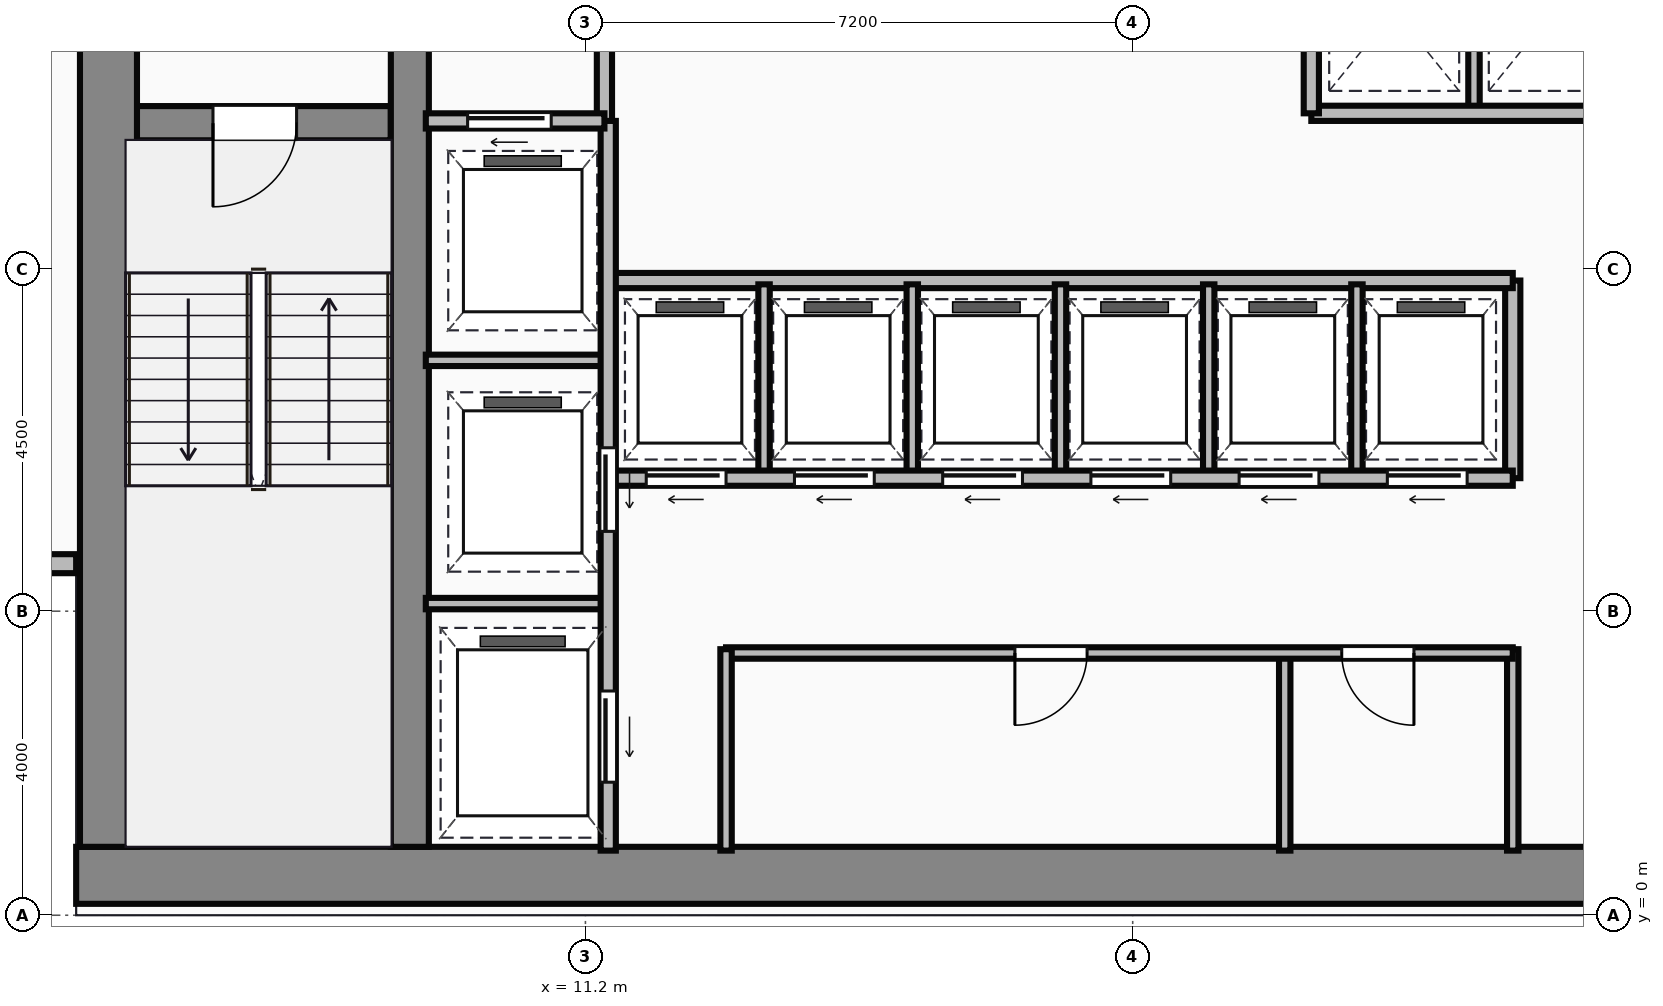
"""IFC4 building model, lengths in metres.
Left out: names, types, materials, properties, quantities, classifications, styles, units other than length and angle.
Written with IfcOpenShell. Run it as: python <this file> out.ifc"""

import sys

from ifc_helpers import new_model, si_unit, direction, frame, frame_2d, origin, place, context, subcontext, project, spatial, rectangle, extrude, source, transform, mapped, element, fill, save


model = new_model("IFC4")
c1 = context("Model", 3, precision=1e-05, world=origin(), true_north=direction((0.0, 1.0)))
c2 = subcontext(c1, "Body", "Model", "MODEL_VIEW")
j1 = project(units=[si_unit("LENGTHUNIT", "METRE"), si_unit("PLANEANGLEUNIT", "RADIAN")], contexts=[c1])
p1 = place(None, origin())
s1 = spatial("IfcSite", under=j1, at=p1, CompositionType="ELEMENT")
p2 = place(p1, origin())
s2 = spatial("IfcBuilding", under=s1, at=p2, CompositionType="ELEMENT")
p3 = place(p2, frame((0.0, 0.0, 106.9)))
s3 = spatial("IfcBuildingStorey", under=s2, at=p3, CompositionType="ELEMENT", Elevation=106.9)
m1 = source(origin(), c2, "Body", "SweptSolid", [
    extrude(rectangle(XDim=29.5, YDim=0.75, at=frame_2d((14.75, 0.0))), origin(), (0.0, 0.0, 1.0), 3.65),
])
p4 = place(p3, frame((4.5, 0.525, 0.0), z_axis=(0.0, 0.0, 1.0), x_axis=(1.0, 0.0, 0.0)))
e1 = element("IfcWall", 1, at=p4, inside=s3, PredefinedType="SHEAR", context=c2, shape_type="MappedRepresentation", body=[
    mapped(m1, transform((0.0, 0.0, 0.0))),
])
m2 = source(origin(), c2, "Body", "SweptSolid", [
    extrude(rectangle(XDim=13.1, YDim=0.75, at=frame_2d((6.55, 0.0))), origin(), (0.0, 0.0, 1.0), 3.65),
])
p5 = place(p3, frame((4.925, 0.9, 0.0), z_axis=(0.0, 0.0, 1.0), x_axis=(0.0, 1.0, 0.0)))
e2 = element("IfcWall", 2, at=p5, inside=s3, PredefinedType="SHEAR", context=c2, shape_type="MappedRepresentation", body=[
    mapped(m2, transform((0.0, 0.0, 0.0))),
])
m3 = source(origin(), c2, "Body", "SweptSolid", [
    extrude(rectangle(XDim=12.35, YDim=0.5, at=frame_2d((6.175, 0.0))), origin(), (0.0, 0.0, 1.0), 3.65),
])
p6 = place(p3, frame((8.89, 0.9, 0.0), z_axis=(0.0, 0.0, 1.0), x_axis=(0.0, 1.0, 0.0)))
e3 = element("IfcWall", 3, at=p6, inside=s3, PredefinedType="SHEAR", context=c2, shape_type="MappedRepresentation", body=[
    mapped(m3, transform((0.0, 0.0, 0.0))),
])
m4 = source(origin(), c2, "Body", "SweptSolid", [
    extrude(rectangle(XDim=3.39, YDim=0.45, at=frame_2d((1.695, 0.0))), origin(), (0.0, 0.0, 1.0), 3.65),
])
p7 = place(p3, frame((5.25, 10.42, 0.0), z_axis=(0.0, 0.0, 1.0), x_axis=(1.0, 0.0, 0.0)))
e4 = element("IfcWall", 4, at=p7, inside=s3, PredefinedType="SHEAR", context=c2, shape_type="MappedRepresentation", body=[
    mapped(m4, transform((0.0, 0.0, 0.0))),
])
p8 = place(p7, frame((1.05, 0.0, 0.0)))
e5 = element("IfcOpeningElement", 5, at=p8, cuts=e4, PredefinedType="OPENING", context=c2, shape_type="SweptSolid", body=[
    extrude(rectangle(XDim=1.1, YDim=2.15, at=frame_2d((0.55, 1.075))), frame((0.0, 0.235, 0.0), z_axis=(0.0, -1.0, 0.0), x_axis=(1.0, 0.0, 0.0)), (0.0, 0.0, 1.0), 0.47),
])
m5 = source(origin(), c2, "Body", "SweptSolid", [
    extrude(rectangle(XDim=4.5, YDim=0.25, at=frame_2d((2.25, 0.0))), origin(), (0.0, 0.0, 1.0), 3.4),
])
p9 = place(p3, frame((0.0, 4.625, 0.0), z_axis=(0.0, 0.0, 1.0), x_axis=(1.0, 0.0, 0.0)))
e6 = element("IfcWall", 6, at=p9, inside=s3, PredefinedType="STANDARD", context=c2, shape_type="MappedRepresentation", body=[
    mapped(m5, transform((0.0, 0.0, 0.0))),
])
m6 = source(origin(), c2, "Body", "SweptSolid", [
    extrude(rectangle(XDim=3.18, YDim=0.2, at=frame_2d((1.59, 0.0))), origin(), (0.0, 0.0, 1.0), 3.4),
])
p10 = place(p3, frame((11.45, 10.42, 0.0), z_axis=(0.0, 0.0, 1.0), x_axis=(0.0, 1.0, 0.0)))
e7 = element("IfcWall", 7, at=p10, inside=s3, PredefinedType="PARTITIONING", context=c2, shape_type="MappedRepresentation", body=[
    mapped(m6, transform((0.0, 0.0, 0.0))),
])
m7 = source(origin(), c2, "Body", "SweptSolid", [
    extrude(rectangle(XDim=2.35, YDim=0.2, at=frame_2d((1.175, 0.0))), origin(), (0.0, 0.0, 1.0), 3.4),
])
p11 = place(p3, frame((9.1, 10.45, 0.0), z_axis=(0.0, 0.0, 1.0), x_axis=(1.0, 0.0, 0.0)))
e8 = element("IfcWall", 8, at=p11, inside=s3, PredefinedType="PARTITIONING", context=c2, shape_type="MappedRepresentation", body=[
    mapped(m7, transform((0.0, 0.0, 0.0))),
])
p12 = place(p11, frame((0.55, 0.0, 0.0)))
e9 = element("IfcOpeningElement", 9, at=p12, cuts=e8, PredefinedType="OPENING", context=c2, shape_type="SweptSolid", body=[
    extrude(rectangle(XDim=1.1, YDim=2.15, at=frame_2d((0.55, 1.075))), frame((0.0, 0.11, 0.0), z_axis=(0.0, -1.0, 0.0), x_axis=(1.0, 0.0, 0.0)), (0.0, 0.0, 1.0), 0.22),
])
m8 = source(origin(), c2, "Body", "SweptSolid", [
    extrude(rectangle(XDim=9.6, YDim=0.2, at=frame_2d((4.8, 0.0))), origin(), (0.0, 0.0, 1.0), 3.4),
])
p13 = place(p3, frame((11.5, 0.85, 0.0), z_axis=(0.0, 0.0, 1.0), x_axis=(0.0, 1.0, 0.0)))
e10 = element("IfcWall", 10, at=p13, inside=s3, PredefinedType="PARTITIONING", context=c2, shape_type="MappedRepresentation", body=[
    mapped(m8, transform((0.0, 0.0, 0.0))),
])
p14 = place(p13, frame((4.2, 0.0, 0.0)))
e11 = element("IfcOpeningElement", 11, at=p14, cuts=e10, PredefinedType="OPENING", context=c2, shape_type="SweptSolid", body=[
    extrude(rectangle(XDim=1.1, YDim=2.15, at=frame_2d((0.55, 1.075))), frame((0.0, 0.11, 0.0), z_axis=(0.0, -1.0, 0.0), x_axis=(1.0, 0.0, 0.0)), (0.0, 0.0, 1.0), 0.22),
])
p15 = place(p13, frame((0.9, 0.0, 0.0)))
e12 = element("IfcOpeningElement", 12, at=p15, cuts=e10, PredefinedType="OPENING", context=c2, shape_type="SweptSolid", body=[
    extrude(rectangle(XDim=1.2, YDim=2.15, at=frame_2d((0.6, 1.075))), frame((0.0, 0.11, 0.0), z_axis=(0.0, -1.0, 0.0), x_axis=(1.0, 0.0, 0.0)), (0.0, 0.0, 1.0), 0.22),
])
m9 = source(origin(), c2, "Body", "SweptSolid", [
    extrude(rectangle(XDim=2.4, YDim=0.15, at=frame_2d((1.2, 0.0))), origin(), (0.0, 0.0, 1.0), 3.4),
])
for number, where, z_axis, x_axis in (
    (13, (9.1, 4.1, 0.0), (0.0, 0.0, 1.0), (1.0, 0.0, 0.0)),
    (14, (9.1, 7.3, 0.0), (0.0, 0.0, 1.0), (1.0, 0.0, 0.0)),
):
    element("IfcWall", number, at=place(p3, frame(where, z_axis=z_axis, x_axis=x_axis)), inside=s3, PredefinedType="PARTITIONING", context=c2, shape_type="MappedRepresentation", body=[
        mapped(m9, transform((0.0, 0.0, 0.0))),
    ])
m10 = source(origin(), c2, "Body", "SweptSolid", [
    extrude(rectangle(XDim=2.65, YDim=0.15, at=frame_2d((1.325, 0.0))), origin(), (0.0, 0.0, 1.0), 3.4),
])
p16 = place(p3, frame((13.05, 0.85, 0.0), z_axis=(0.0, 0.0, 1.0), x_axis=(0.0, 1.0, 0.0)))
e15 = element("IfcWall", 15, at=p16, inside=s3, PredefinedType="PARTITIONING", context=c2, shape_type="MappedRepresentation", body=[
    mapped(m10, transform((0.0, 0.0, 0.0))),
])
m11 = source(origin(), c2, "Body", "SweptSolid", [
    extrude(rectangle(XDim=10.35, YDim=0.15, at=frame_2d((5.175, 0.0))), origin(), (0.0, 0.0, 1.0), 3.4),
])
p17 = place(p3, frame((13.05, 3.45, 0.0), z_axis=(0.0, 0.0, 1.0), x_axis=(1.0, 0.0, 0.0)))
e16 = element("IfcWall", 16, at=p17, inside=s3, PredefinedType="PARTITIONING", context=c2, shape_type="MappedRepresentation", body=[
    mapped(m11, transform((0.0, 0.0, 0.0))),
])
p18 = place(p17, frame((3.8, 0.0, 0.0)))
e17 = element("IfcOpeningElement", 17, at=p18, cuts=e16, PredefinedType="OPENING", context=c2, shape_type="SweptSolid", body=[
    extrude(rectangle(XDim=0.95, YDim=2.15, at=frame_2d((0.475, 1.075))), frame((0.0, 0.085, 0.0), z_axis=(0.0, -1.0, 0.0), x_axis=(1.0, 0.0, 0.0)), (0.0, 0.0, 1.0), 0.17),
])
p19 = place(p17, frame((8.1, 0.0, 0.0)))
e18 = element("IfcOpeningElement", 18, at=p19, cuts=e16, PredefinedType="OPENING", context=c2, shape_type="SweptSolid", body=[
    extrude(rectangle(XDim=0.95, YDim=2.15, at=frame_2d((0.475, 1.075))), frame((0.0, 0.085, 0.0), z_axis=(0.0, -1.0, 0.0), x_axis=(1.0, 0.0, 0.0)), (0.0, 0.0, 1.0), 0.17),
])
p20 = place(p3, frame((23.4, 0.85, 0.0), z_axis=(0.0, 0.0, 1.0), x_axis=(0.0, 1.0, 0.0)))
e19 = element("IfcWall", 19, at=p20, inside=s3, PredefinedType="PARTITIONING", context=c2, shape_type="MappedRepresentation", body=[
    mapped(m10, transform((0.0, 0.0, 0.0))),
])
m12 = source(origin(), c2, "Body", "SweptSolid", [
    extrude(rectangle(XDim=2.6, YDim=0.15, at=frame_2d((1.3, 0.0))), origin(), (0.0, 0.0, 1.0), 3.4),
])
p21 = place(p3, frame((20.4, 0.85, 0.0), z_axis=(0.0, 0.0, 1.0), x_axis=(0.0, 1.0, 0.0)))
e20 = element("IfcWall", 20, at=p21, inside=s3, PredefinedType="PARTITIONING", context=c2, shape_type="MappedRepresentation", body=[
    mapped(m12, transform((0.0, 0.0, 0.0))),
])
m13 = source(origin(), c2, "Body", "SweptSolid", [
    extrude(rectangle(XDim=11.85, YDim=0.2, at=frame_2d((5.925, 0.0))), origin(), (0.0, 0.0, 1.0), 3.4),
])
p22 = place(p3, frame((11.55, 5.75, 0.0), z_axis=(0.0, 0.0, 1.0), x_axis=(1.0, 0.0, 0.0)))
e21 = element("IfcWall", 21, at=p22, inside=s3, PredefinedType="PARTITIONING", context=c2, shape_type="MappedRepresentation", body=[
    mapped(m13, transform((0.0, 0.0, 0.0))),
])
p23 = place(p22, frame((0.45, 0.0, 0.0)))
e22 = element("IfcOpeningElement", 22, at=p23, cuts=e21, PredefinedType="OPENING", context=c2, shape_type="SweptSolid", body=[
    extrude(rectangle(XDim=1.05, YDim=2.15, at=frame_2d((0.525, 1.075))), frame((0.0, 0.11, 0.0), z_axis=(0.0, -1.0, 0.0), x_axis=(1.0, 0.0, 0.0)), (0.0, 0.0, 1.0), 0.22),
])
p24 = place(p22, frame((2.4, 0.0, 0.0)))
e23 = element("IfcOpeningElement", 23, at=p24, cuts=e21, PredefinedType="OPENING", context=c2, shape_type="SweptSolid", body=[
    extrude(rectangle(XDim=1.05, YDim=2.15, at=frame_2d((0.525, 1.075))), frame((0.0, 0.11, 0.0), z_axis=(0.0, -1.0, 0.0), x_axis=(1.0, 0.0, 0.0)), (0.0, 0.0, 1.0), 0.22),
])
p25 = place(p22, frame((4.35, 0.0, 0.0)))
e24 = element("IfcOpeningElement", 24, at=p25, cuts=e21, PredefinedType="OPENING", context=c2, shape_type="SweptSolid", body=[
    extrude(rectangle(XDim=1.05, YDim=2.15, at=frame_2d((0.525, 1.075))), frame((0.0, 0.11, 0.0), z_axis=(0.0, -1.0, 0.0), x_axis=(1.0, 0.0, 0.0)), (0.0, 0.0, 1.0), 0.22),
])
p26 = place(p22, frame((6.3, 0.0, 0.0)))
e25 = element("IfcOpeningElement", 25, at=p26, cuts=e21, PredefinedType="OPENING", context=c2, shape_type="SweptSolid", body=[
    extrude(rectangle(XDim=1.05, YDim=2.15, at=frame_2d((0.525, 1.075))), frame((0.0, 0.11, 0.0), z_axis=(0.0, -1.0, 0.0), x_axis=(1.0, 0.0, 0.0)), (0.0, 0.0, 1.0), 0.22),
])
p27 = place(p22, frame((8.25, 0.0, 0.0)))
e26 = element("IfcOpeningElement", 26, at=p27, cuts=e21, PredefinedType="OPENING", context=c2, shape_type="SweptSolid", body=[
    extrude(rectangle(XDim=1.05, YDim=2.15, at=frame_2d((0.525, 1.075))), frame((0.0, 0.11, 0.0), z_axis=(0.0, -1.0, 0.0), x_axis=(1.0, 0.0, 0.0)), (0.0, 0.0, 1.0), 0.22),
])
p28 = place(p22, frame((10.2, 0.0, 0.0)))
e27 = element("IfcOpeningElement", 27, at=p28, cuts=e21, PredefinedType="OPENING", context=c2, shape_type="SweptSolid", body=[
    extrude(rectangle(XDim=1.05, YDim=2.15, at=frame_2d((0.525, 1.075))), frame((0.0, 0.11, 0.0), z_axis=(0.0, -1.0, 0.0), x_axis=(1.0, 0.0, 0.0)), (0.0, 0.0, 1.0), 0.22),
])
p29 = place(p3, frame((11.55, 8.35, 0.0), z_axis=(0.0, 0.0, 1.0), x_axis=(1.0, 0.0, 0.0)))
e28 = element("IfcWall", 28, at=p29, inside=s3, PredefinedType="PARTITIONING", context=c2, shape_type="MappedRepresentation", body=[
    mapped(m13, transform((0.0, 0.0, 0.0))),
])
m14 = source(origin(), c2, "Body", "SweptSolid", [
    extrude(rectangle(XDim=2.6, YDim=0.2, at=frame_2d((1.3, 0.0))), origin(), (0.0, 0.0, 1.0), 3.4),
])
p30 = place(p3, frame((23.4, 5.75, 0.0), z_axis=(0.0, 0.0, 1.0), x_axis=(0.0, 1.0, 0.0)))
e29 = element("IfcWall", 29, at=p30, inside=s3, PredefinedType="PARTITIONING", context=c2, shape_type="MappedRepresentation", body=[
    mapped(m14, transform((0.0, 0.0, 0.0))),
])
m15 = source(origin(), c2, "Body", "SweptSolid", [
    extrude(rectangle(XDim=2.5, YDim=0.15, at=frame_2d((1.25, 0.0))), origin(), (0.0, 0.0, 1.0), 3.4),
])
for number, where, z_axis, x_axis in (
    (30, (13.55, 5.8, 0.0), (0.0, 0.0, 1.0), (0.0, 1.0, 0.0)),
    (31, (15.5, 5.8, 0.0), (0.0, 0.0, 1.0), (0.0, 1.0, 0.0)),
    (32, (17.45, 5.8, 0.0), (0.0, 0.0, 1.0), (0.0, 1.0, 0.0)),
    (33, (19.4, 5.8, 0.0), (0.0, 0.0, 1.0), (0.0, 1.0, 0.0)),
    (34, (21.35, 5.8, 0.0), (0.0, 0.0, 1.0), (0.0, 1.0, 0.0)),
):
    element("IfcWall", number, at=place(p3, frame(where, z_axis=z_axis, x_axis=x_axis)), inside=s3, PredefinedType="PARTITIONING", context=c2, shape_type="MappedRepresentation", body=[
        mapped(m15, transform((0.0, 0.0, 0.0))),
    ])
m16 = source(origin(), c2, "Body", "SweptSolid", [
    extrude(rectangle(XDim=8.8, YDim=0.2, at=frame_2d((4.4, 0.0))), origin(), (0.0, 0.0, 1.0), 3.4),
])
p31 = place(p3, frame((20.75, 10.55, 0.0), z_axis=(0.0, 0.0, 1.0), x_axis=(1.0, 0.0, 0.0)))
e35 = element("IfcWall", 35, at=p31, inside=s3, PredefinedType="PARTITIONING", context=c2, shape_type="MappedRepresentation", body=[
    mapped(m16, transform((0.0, 0.0, 0.0))),
])
m17 = source(origin(), c2, "Body", "SweptSolid", [
    extrude(rectangle(XDim=3.0, YDim=0.2, at=frame_2d((1.5, 0.0))), origin(), (0.0, 0.0, 1.0), 3.4),
])
p32 = place(p3, frame((20.75, 10.55, 0.0), z_axis=(0.0, 0.0, 1.0), x_axis=(0.0, 1.0, 0.0)))
e36 = element("IfcWall", 36, at=p32, inside=s3, PredefinedType="PARTITIONING", context=c2, shape_type="MappedRepresentation", body=[
    mapped(m17, transform((0.0, 0.0, 0.0))),
])
m18 = source(origin(), c2, "Body", "SweptSolid", [
    extrude(rectangle(XDim=2.85, YDim=0.15, at=frame_2d((1.425, 0.0))), origin(), (0.0, 0.0, 1.0), 3.4),
])
p33 = place(p3, frame((22.89, 10.6, 0.0), z_axis=(0.0, 0.0, 1.0), x_axis=(0.0, 1.0, 0.0)))
e37 = element("IfcWall", 37, at=p33, inside=s3, PredefinedType="PARTITIONING", context=c2, shape_type="MappedRepresentation", body=[
    mapped(m18, transform((0.0, 0.0, 0.0))),
])
m19 = source(origin(), c2, "Body", "SweptSolid", [
    extrude(rectangle(XDim=1.1, YDim=2.15, at=frame_2d((0.55, 1.075))), frame((0.0, 0.025, 0.0), z_axis=(0.0, -1.0, 0.0), x_axis=(1.0, 0.0, 0.0)), (0.0, 0.0, 1.0), 0.05),
])
p34 = place(p8, frame((1.1, 0.0, 0.0), z_axis=(0.0, 0.0, 1.0), x_axis=(-1.0, 0.0, 0.0)))
e38 = element("IfcDoor", 38, at=p34, inside=s3, OperationType="SINGLE_SWING_LEFT", PredefinedType="DOOR", context=c2, shape_type="MappedRepresentation", body=[
    mapped(m19, transform((0.0, 0.0, 0.0))),
])
fill(e5, e38)
p35 = place(p12, origin())
e39 = element("IfcDoor", 39, at=p35, inside=s3, OperationType="SLIDING_TO_LEFT", PredefinedType="DOOR", context=c2, shape_type="MappedRepresentation", body=[
    mapped(m19, transform((0.0, 0.0, 0.0))),
])
fill(e9, e39)
p36 = place(p14, frame((1.1, 0.0, 0.0), z_axis=(0.0, 0.0, 1.0), x_axis=(-1.0, 0.0, 0.0)))
e40 = element("IfcDoor", 40, at=p36, inside=s3, OperationType="SLIDING_TO_LEFT", PredefinedType="DOOR", context=c2, shape_type="MappedRepresentation", body=[
    mapped(m19, transform((0.0, 0.0, 0.0))),
])
fill(e11, e40)
m20 = source(origin(), c2, "Body", "SweptSolid", [
    extrude(rectangle(XDim=1.2, YDim=2.15, at=frame_2d((0.6, 1.075))), frame((0.0, 0.025, 0.0), z_axis=(0.0, -1.0, 0.0), x_axis=(1.0, 0.0, 0.0)), (0.0, 0.0, 1.0), 0.05),
])
p37 = place(p15, frame((1.2, 0.0, 0.0), z_axis=(0.0, 0.0, 1.0), x_axis=(-1.0, 0.0, 0.0)))
e41 = element("IfcDoor", 41, at=p37, inside=s3, OperationType="SLIDING_TO_LEFT", PredefinedType="DOOR", context=c2, shape_type="MappedRepresentation", body=[
    mapped(m20, transform((0.0, 0.0, 0.0))),
])
fill(e12, e41)
m21 = source(origin(), c2, "Body", "SweptSolid", [
    extrude(rectangle(XDim=0.95, YDim=2.15, at=frame_2d((0.475, 1.075))), frame((0.0, 0.025, 0.0), z_axis=(0.0, -1.0, 0.0), x_axis=(1.0, 0.0, 0.0)), (0.0, 0.0, 1.0), 0.05),
])
p38 = place(p18, origin())
e42 = element("IfcDoor", 42, at=p38, inside=s3, OperationType="SINGLE_SWING_LEFT", PredefinedType="DOOR", context=c2, shape_type="MappedRepresentation", body=[
    mapped(m21, transform((0.0, 0.0, 0.0))),
])
fill(e17, e42)
p39 = place(p19, origin())
e43 = element("IfcDoor", 43, at=p39, inside=s3, OperationType="SINGLE_SWING_RIGHT", PredefinedType="DOOR", context=c2, shape_type="MappedRepresentation", body=[
    mapped(m21, transform((0.0, 0.0, 0.0))),
])
fill(e18, e43)
m22 = source(origin(), c2, "Body", "SweptSolid", [
    extrude(rectangle(XDim=1.05, YDim=2.15, at=frame_2d((0.525, 1.075))), frame((0.0, 0.025, 0.0), z_axis=(0.0, -1.0, 0.0), x_axis=(1.0, 0.0, 0.0)), (0.0, 0.0, 1.0), 0.05),
])
p40 = place(p23, frame((1.05, 0.0, 0.0), z_axis=(0.0, 0.0, 1.0), x_axis=(-1.0, 0.0, 0.0)))
e44 = element("IfcDoor", 44, at=p40, inside=s3, OperationType="SLIDING_TO_LEFT", PredefinedType="DOOR", context=c2, shape_type="MappedRepresentation", body=[
    mapped(m22, transform((0.0, 0.0, 0.0))),
])
fill(e22, e44)
p41 = place(p24, frame((1.05, 0.0, 0.0), z_axis=(0.0, 0.0, 1.0), x_axis=(-1.0, 0.0, 0.0)))
e45 = element("IfcDoor", 45, at=p41, inside=s3, OperationType="SLIDING_TO_LEFT", PredefinedType="DOOR", context=c2, shape_type="MappedRepresentation", body=[
    mapped(m22, transform((0.0, 0.0, 0.0))),
])
fill(e23, e45)
p42 = place(p25, frame((1.05, 0.0, 0.0), z_axis=(0.0, 0.0, 1.0), x_axis=(-1.0, 0.0, 0.0)))
e46 = element("IfcDoor", 46, at=p42, inside=s3, OperationType="SLIDING_TO_LEFT", PredefinedType="DOOR", context=c2, shape_type="MappedRepresentation", body=[
    mapped(m22, transform((0.0, 0.0, 0.0))),
])
fill(e24, e46)
p43 = place(p26, frame((1.05, 0.0, 0.0), z_axis=(0.0, 0.0, 1.0), x_axis=(-1.0, 0.0, 0.0)))
e47 = element("IfcDoor", 47, at=p43, inside=s3, OperationType="SLIDING_TO_LEFT", PredefinedType="DOOR", context=c2, shape_type="MappedRepresentation", body=[
    mapped(m22, transform((0.0, 0.0, 0.0))),
])
fill(e25, e47)
p44 = place(p27, frame((1.05, 0.0, 0.0), z_axis=(0.0, 0.0, 1.0), x_axis=(-1.0, 0.0, 0.0)))
e48 = element("IfcDoor", 48, at=p44, inside=s3, OperationType="SLIDING_TO_LEFT", PredefinedType="DOOR", context=c2, shape_type="MappedRepresentation", body=[
    mapped(m22, transform((0.0, 0.0, 0.0))),
])
fill(e26, e48)
p45 = place(p28, frame((1.05, 0.0, 0.0), z_axis=(0.0, 0.0, 1.0), x_axis=(-1.0, 0.0, 0.0)))
e49 = element("IfcDoor", 49, at=p45, inside=s3, OperationType="SLIDING_TO_LEFT", PredefinedType="DOOR", context=c2, shape_type="MappedRepresentation", body=[
    mapped(m22, transform((0.0, 0.0, 0.0))),
])
fill(e27, e49)
save(model, sys.argv[1])
